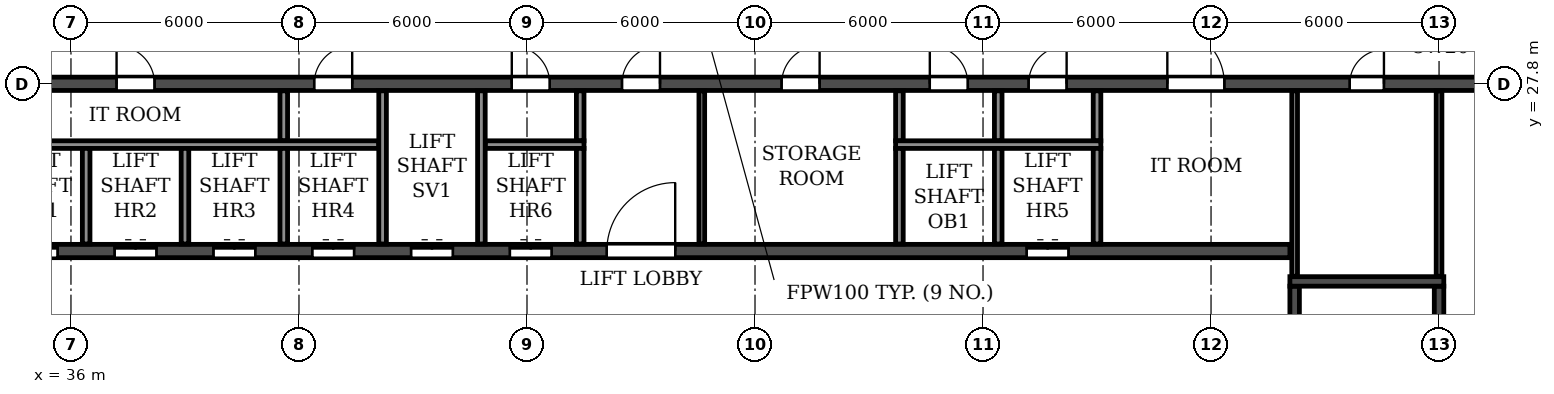
"""IFC4 building model, lengths in metres.
Left out: names, types, materials, properties, quantities, classifications, styles, units other than length and angle.
Written with IfcOpenShell. Run it as: python <this file> out.ifc"""

import sys

from ifc_helpers import new_model, si_unit, direction, frame, frame_2d, origin, place, context, subcontext, project, spatial, rectangle, extrude, element, fill, save


model = new_model("IFC4")
c1 = context("Model", 3, precision=1e-05, world=origin(), true_north=direction((0.0, 1.0)))
c2 = subcontext(c1, "Body", "Model", "MODEL_VIEW")
j1 = project(units=[si_unit("LENGTHUNIT", "METRE"), si_unit("PLANEANGLEUNIT", "RADIAN")], contexts=[c1])
p1 = place(None, origin())
s1 = spatial("IfcSite", under=j1, at=p1, CompositionType="ELEMENT")
p2 = place(p1, origin())
s2 = spatial("IfcBuilding", under=s1, at=p2, CompositionType="ELEMENT")
p3 = place(p2, frame((0.0, 0.0, 257.7)))
s3 = spatial("IfcBuildingStorey", under=s2, at=p3, CompositionType="ELEMENT", Elevation=257.7)
p4 = place(p3, frame((18.2, 27.8, 0.0), z_axis=(0.0, 0.0, 1.0), x_axis=(1.0, 0.0, 0.0)))
e1 = element("IfcWall", 1, at=p4, inside=s3, PredefinedType="SOLIDWALL", context=c2, shape_type="SweptSolid", body=[
    extrude(rectangle(XDim=65.6, YDim=0.35, at=frame_2d((32.8, 0.0))), origin(), (0.0, 0.0, 1.0), 3.0),
])
p5 = place(p4, frame((0.7, 0.0, 0.0)))
e2 = element("IfcOpeningElement", 2, at=p5, cuts=e1, PredefinedType="OPENING", context=c2, shape_type="SweptSolid", body=[
    extrude(rectangle(XDim=1.0, YDim=2.1, at=frame_2d((0.5, 1.05))), frame((0.0, 0.185, 0.0), z_axis=(0.0, -1.0, 0.0), x_axis=(1.0, 0.0, 0.0)), (0.0, 0.0, 1.0), 0.37),
])
p6 = place(p4, frame((4.05, 0.0, 0.0)))
e3 = element("IfcOpeningElement", 3, at=p6, cuts=e1, PredefinedType="OPENING", context=c2, shape_type="SweptSolid", body=[
    extrude(rectangle(XDim=0.9, YDim=2.1, at=frame_2d((0.45, 1.05))), frame((0.0, 0.185, 0.0), z_axis=(0.0, -1.0, 0.0), x_axis=(1.0, 0.0, 0.0)), (0.0, 0.0, 1.0), 0.37),
])
p7 = place(p4, frame((13.25, 0.0, 0.0)))
e4 = element("IfcOpeningElement", 4, at=p7, cuts=e1, PredefinedType="OPENING", context=c2, shape_type="SweptSolid", body=[
    extrude(rectangle(XDim=0.9, YDim=2.1, at=frame_2d((0.45, 1.05))), frame((0.0, 0.185, 0.0), z_axis=(0.0, -1.0, 0.0), x_axis=(1.0, 0.0, 0.0)), (0.0, 0.0, 1.0), 0.37),
])
p8 = place(p4, frame((19.0, 0.0, 0.0)))
e5 = element("IfcOpeningElement", 5, at=p8, cuts=e1, PredefinedType="OPENING", context=c2, shape_type="SweptSolid", body=[
    extrude(rectangle(XDim=1.0, YDim=2.1, at=frame_2d((0.5, 1.05))), frame((0.0, 0.185, 0.0), z_axis=(0.0, -1.0, 0.0), x_axis=(1.0, 0.0, 0.0)), (0.0, 0.0, 1.0), 0.37),
])
p9 = place(p4, frame((24.2, 0.0, 0.0)))
e6 = element("IfcOpeningElement", 6, at=p9, cuts=e1, PredefinedType="OPENING", context=c2, shape_type="SweptSolid", body=[
    extrude(rectangle(XDim=1.0, YDim=2.1, at=frame_2d((0.5, 1.05))), frame((0.0, 0.185, 0.0), z_axis=(0.0, -1.0, 0.0), x_axis=(1.0, 0.0, 0.0)), (0.0, 0.0, 1.0), 0.37),
])
p10 = place(p4, frame((29.4, 0.0, 0.0)))
e7 = element("IfcOpeningElement", 7, at=p10, cuts=e1, PredefinedType="OPENING", context=c2, shape_type="SweptSolid", body=[
    extrude(rectangle(XDim=1.0, YDim=2.1, at=frame_2d((0.5, 1.05))), frame((0.0, 0.185, 0.0), z_axis=(0.0, -1.0, 0.0), x_axis=(1.0, 0.0, 0.0)), (0.0, 0.0, 1.0), 0.37),
])
p11 = place(p4, frame((32.3, 0.0, 0.0)))
e8 = element("IfcOpeningElement", 8, at=p11, cuts=e1, PredefinedType="OPENING", context=c2, shape_type="SweptSolid", body=[
    extrude(rectangle(XDim=1.0, YDim=2.1, at=frame_2d((0.5, 1.05))), frame((0.0, 0.185, 0.0), z_axis=(0.0, -1.0, 0.0), x_axis=(1.0, 0.0, 0.0)), (0.0, 0.0, 1.0), 0.37),
])
p12 = place(p4, frame((36.5, 0.0, 0.0)))
e9 = element("IfcOpeningElement", 9, at=p12, cuts=e1, PredefinedType="OPENING", context=c2, shape_type="SweptSolid", body=[
    extrude(rectangle(XDim=1.0, YDim=2.1, at=frame_2d((0.5, 1.05))), frame((0.0, 0.185, 0.0), z_axis=(0.0, -1.0, 0.0), x_axis=(1.0, 0.0, 0.0)), (0.0, 0.0, 1.0), 0.37),
])
p13 = place(p4, frame((40.4, 0.0, 0.0)))
e10 = element("IfcOpeningElement", 10, at=p13, cuts=e1, PredefinedType="OPENING", context=c2, shape_type="SweptSolid", body=[
    extrude(rectangle(XDim=1.0, YDim=2.1, at=frame_2d((0.5, 1.05))), frame((0.0, 0.185, 0.0), z_axis=(0.0, -1.0, 0.0), x_axis=(1.0, 0.0, 0.0)), (0.0, 0.0, 1.0), 0.37),
])
p14 = place(p4, frame((43.0, 0.0, 0.0)))
e11 = element("IfcOpeningElement", 11, at=p14, cuts=e1, PredefinedType="OPENING", context=c2, shape_type="SweptSolid", body=[
    extrude(rectangle(XDim=1.0, YDim=2.1, at=frame_2d((0.5, 1.05))), frame((0.0, 0.185, 0.0), z_axis=(0.0, -1.0, 0.0), x_axis=(1.0, 0.0, 0.0)), (0.0, 0.0, 1.0), 0.37),
])
p15 = place(p4, frame((46.65, 0.0, 0.0)))
e12 = element("IfcOpeningElement", 12, at=p15, cuts=e1, PredefinedType="OPENING", context=c2, shape_type="SweptSolid", body=[
    extrude(rectangle(XDim=1.5, YDim=2.1, at=frame_2d((0.75, 1.05))), frame((0.0, 0.185, 0.0), z_axis=(0.0, -1.0, 0.0), x_axis=(1.0, 0.0, 0.0)), (0.0, 0.0, 1.0), 0.37),
])
p16 = place(p4, frame((51.45, 0.0, 0.0)))
e13 = element("IfcOpeningElement", 13, at=p16, cuts=e1, PredefinedType="OPENING", context=c2, shape_type="SweptSolid", body=[
    extrude(rectangle(XDim=0.9, YDim=2.1, at=frame_2d((0.45, 1.05))), frame((0.0, 0.185, 0.0), z_axis=(0.0, -1.0, 0.0), x_axis=(1.0, 0.0, 0.0)), (0.0, 0.0, 1.0), 0.37),
])
p17 = place(p4, frame((60.65, 0.0, 0.0)))
e14 = element("IfcOpeningElement", 14, at=p17, cuts=e1, PredefinedType="OPENING", context=c2, shape_type="SweptSolid", body=[
    extrude(rectangle(XDim=0.9, YDim=2.1, at=frame_2d((0.45, 1.05))), frame((0.0, 0.185, 0.0), z_axis=(0.0, -1.0, 0.0), x_axis=(1.0, 0.0, 0.0)), (0.0, 0.0, 1.0), 0.37),
])
p18 = place(p4, frame((63.9, 0.0, 0.0)))
e15 = element("IfcOpeningElement", 15, at=p18, cuts=e1, PredefinedType="OPENING", context=c2, shape_type="SweptSolid", body=[
    extrude(rectangle(XDim=1.0, YDim=2.1, at=frame_2d((0.5, 1.05))), frame((0.0, 0.185, 0.0), z_axis=(0.0, -1.0, 0.0), x_axis=(1.0, 0.0, 0.0)), (0.0, 0.0, 1.0), 0.37),
])
p19 = place(p3, frame((33.925, 23.4, 0.0), z_axis=(0.0, 0.0, 1.0), x_axis=(1.0, 0.0, 0.0)))
e16 = element("IfcWall", 16, at=p19, inside=s3, PredefinedType="SOLIDWALL", context=c2, shape_type="SweptSolid", body=[
    extrude(rectangle(XDim=34.15, YDim=0.35, at=frame_2d((17.075, 0.0))), origin(), (0.0, 0.0, 1.0), 3.0),
])
p20 = place(p19, frame((16.175, 0.0, 0.0)))
e17 = element("IfcOpeningElement", 17, at=p20, cuts=e16, PredefinedType="OPENING", context=c2, shape_type="SweptSolid", body=[
    extrude(rectangle(XDim=1.8, YDim=2.1, at=frame_2d((0.9, 1.05))), frame((0.0, 0.185, 0.0), z_axis=(0.0, -1.0, 0.0), x_axis=(1.0, 0.0, 0.0)), (0.0, 0.0, 1.0), 0.37),
])
p21 = place(p19, frame((0.625, 0.0, 0.0)))
e18 = element("IfcOpeningElement", 18, at=p21, cuts=e16, PredefinedType="OPENING", context=c2, shape_type="SweptSolid", body=[
    extrude(rectangle(XDim=1.1, YDim=2.1, at=frame_2d((0.55, 1.05))), frame((0.0, 0.185, 0.0), z_axis=(0.0, -1.0, 0.0), x_axis=(1.0, 0.0, 0.0)), (0.0, 0.0, 1.0), 0.37),
])
p22 = place(p19, frame((3.225, 0.0, 0.0)))
e19 = element("IfcOpeningElement", 19, at=p22, cuts=e16, PredefinedType="OPENING", context=c2, shape_type="SweptSolid", body=[
    extrude(rectangle(XDim=1.1, YDim=2.1, at=frame_2d((0.55, 1.05))), frame((0.0, 0.185, 0.0), z_axis=(0.0, -1.0, 0.0), x_axis=(1.0, 0.0, 0.0)), (0.0, 0.0, 1.0), 0.37),
])
p23 = place(p19, frame((5.825, 0.0, 0.0)))
e20 = element("IfcOpeningElement", 20, at=p23, cuts=e16, PredefinedType="OPENING", context=c2, shape_type="SweptSolid", body=[
    extrude(rectangle(XDim=1.1, YDim=2.1, at=frame_2d((0.55, 1.05))), frame((0.0, 0.185, 0.0), z_axis=(0.0, -1.0, 0.0), x_axis=(1.0, 0.0, 0.0)), (0.0, 0.0, 1.0), 0.37),
])
p24 = place(p19, frame((8.425, 0.0, 0.0)))
e21 = element("IfcOpeningElement", 21, at=p24, cuts=e16, PredefinedType="OPENING", context=c2, shape_type="SweptSolid", body=[
    extrude(rectangle(XDim=1.1, YDim=2.1, at=frame_2d((0.55, 1.05))), frame((0.0, 0.185, 0.0), z_axis=(0.0, -1.0, 0.0), x_axis=(1.0, 0.0, 0.0)), (0.0, 0.0, 1.0), 0.37),
])
p25 = place(p19, frame((11.025, 0.0, 0.0)))
e22 = element("IfcOpeningElement", 22, at=p25, cuts=e16, PredefinedType="OPENING", context=c2, shape_type="SweptSolid", body=[
    extrude(rectangle(XDim=1.1, YDim=2.1, at=frame_2d((0.55, 1.05))), frame((0.0, 0.185, 0.0), z_axis=(0.0, -1.0, 0.0), x_axis=(1.0, 0.0, 0.0)), (0.0, 0.0, 1.0), 0.37),
])
p26 = place(p19, frame((13.625, 0.0, 0.0)))
e23 = element("IfcOpeningElement", 23, at=p26, cuts=e16, PredefinedType="OPENING", context=c2, shape_type="SweptSolid", body=[
    extrude(rectangle(XDim=1.1, YDim=2.1, at=frame_2d((0.55, 1.05))), frame((0.0, 0.185, 0.0), z_axis=(0.0, -1.0, 0.0), x_axis=(1.0, 0.0, 0.0)), (0.0, 0.0, 1.0), 0.37),
])
p27 = place(p19, frame((27.225, 0.0, 0.0)))
e24 = element("IfcOpeningElement", 24, at=p27, cuts=e16, PredefinedType="OPENING", context=c2, shape_type="SweptSolid", body=[
    extrude(rectangle(XDim=1.1, YDim=2.1, at=frame_2d((0.55, 1.05))), frame((0.0, 0.185, 0.0), z_axis=(0.0, -1.0, 0.0), x_axis=(1.0, 0.0, 0.0)), (0.0, 0.0, 1.0), 0.37),
])
p28 = place(p3, frame((68.2, 14.775, 0.0), z_axis=(0.0, 0.0, 1.0), x_axis=(0.0, 1.0, 0.0)))
e25 = element("IfcWall", 25, at=p28, inside=s3, PredefinedType="SOLIDWALL", context=c2, shape_type="SweptSolid", body=[
    extrude(rectangle(XDim=7.7, YDim=0.25, at=frame_2d((3.85, 0.0))), origin(), (0.0, 0.0, 1.0), 3.0),
])
p29 = place(p28, frame((0.525, 0.0, 0.0)))
e26 = element("IfcOpeningElement", 26, at=p29, cuts=e25, PredefinedType="OPENING", context=c2, shape_type="SweptSolid", body=[
    extrude(rectangle(XDim=1.0, YDim=2.1, at=frame_2d((0.5, 1.05))), frame((0.0, 0.135, 0.0), z_axis=(0.0, -1.0, 0.0), x_axis=(1.0, 0.0, 0.0)), (0.0, 0.0, 1.0), 0.27),
])
p30 = place(p3, frame((72.0, 14.775, 0.0), z_axis=(0.0, 0.0, 1.0), x_axis=(0.0, 1.0, 0.0)))
e27 = element("IfcWall", 27, at=p30, inside=s3, PredefinedType="SOLIDWALL", context=c2, shape_type="SweptSolid", body=[
    extrude(rectangle(XDim=7.7, YDim=0.25, at=frame_2d((3.85, 0.0))), origin(), (0.0, 0.0, 1.0), 3.0),
])
p31 = place(p3, frame((68.075, 22.6, 0.0), z_axis=(0.0, 0.0, 1.0), x_axis=(1.0, 0.0, 0.0)))
e28 = element("IfcWall", 28, at=p31, inside=s3, PredefinedType="SOLIDWALL", context=c2, shape_type="SweptSolid", body=[
    extrude(rectangle(XDim=4.05, YDim=0.25, at=frame_2d((2.025, 0.0))), origin(), (0.0, 0.0, 1.0), 3.0),
])
p32 = place(p3, frame((52.6, 23.585, 0.0), z_axis=(0.0, 0.0, 1.0), x_axis=(0.0, 1.0, 0.0)))
e29 = element("IfcWall", 29, at=p32, inside=s3, PredefinedType="PARTITIONING", context=c2, shape_type="SweptSolid", body=[
    extrude(rectangle(XDim=4.03, YDim=0.15, at=frame_2d((2.015, 0.0))), origin(), (0.0, 0.0, 1.0), 3.0),
])
for number, where, z_axis, x_axis in (
    (30, (41.6, 26.3, 0.0), (0.0, 0.0, 1.0), (0.0, 1.0, 0.0)),
    (31, (49.4, 26.3, 0.0), (0.0, 0.0, 1.0), (0.0, 1.0, 0.0)),
    (32, (57.8, 26.3, 0.0), (0.0, 0.0, 1.0), (0.0, 1.0, 0.0)),
    (33, (60.4, 26.3, 0.0), (0.0, 0.0, 1.0), (0.0, 1.0, 0.0)),
    (34, (63.0, 26.3, 0.0), (0.0, 0.0, 1.0), (0.0, 1.0, 0.0)),
):
    element("IfcWall", number, at=place(p3, frame(where, z_axis=z_axis, x_axis=x_axis)), inside=s3, PredefinedType="PARTITIONING", context=c2, shape_type="SweptSolid", body=[
        extrude(rectangle(XDim=1.315, YDim=0.2, at=frame_2d((0.657, 0.0))), origin(), (0.0, 0.0, 1.0), 3.0),
    ])
for number, where, z_axis, x_axis in (
    (35, (68.2, 22.735, 0.0), (0.0, 0.0, 1.0), (0.0, 1.0, 0.0)),
    (36, (72.0, 22.735, 0.0), (0.0, 0.0, 1.0), (0.0, 1.0, 0.0)),
):
    element("IfcWall", number, at=place(p3, frame(where, z_axis=z_axis, x_axis=x_axis)), inside=s3, PredefinedType="PARTITIONING", context=c2, shape_type="SweptSolid", body=[
        extrude(rectangle(XDim=4.88, YDim=0.15, at=frame_2d((2.44, 0.0))), origin(), (0.0, 0.0, 1.0), 3.0),
    ])
p33 = place(p3, frame((33.7, 26.2, 0.0), z_axis=(0.0, 0.0, 1.0), x_axis=(1.0, 0.0, 0.0)))
e37 = element("IfcWall", 37, at=p33, inside=s3, PredefinedType="PARTITIONING", context=c2, shape_type="SweptSolid", body=[
    extrude(rectangle(XDim=10.4, YDim=0.2, at=frame_2d((5.2, 0.0))), origin(), (0.0, 0.0, 1.0), 3.0),
])
p34 = place(p3, frame((46.9, 26.2, 0.0), z_axis=(0.0, 0.0, 1.0), x_axis=(1.0, 0.0, 0.0)))
e38 = element("IfcWall", 38, at=p34, inside=s3, PredefinedType="PARTITIONING", context=c2, shape_type="SweptSolid", body=[
    extrude(rectangle(XDim=2.6, YDim=0.2, at=frame_2d((1.3, 0.0))), origin(), (0.0, 0.0, 1.0), 3.0),
])
p35 = place(p3, frame((57.7, 26.2, 0.0), z_axis=(0.0, 0.0, 1.0), x_axis=(1.0, 0.0, 0.0)))
e39 = element("IfcWall", 39, at=p35, inside=s3, PredefinedType="PARTITIONING", context=c2, shape_type="SweptSolid", body=[
    extrude(rectangle(XDim=5.4, YDim=0.2, at=frame_2d((2.7, 0.0))), origin(), (0.0, 0.0, 1.0), 3.0),
])
for number, where, z_axis, x_axis in (
    (40, (36.4, 23.585, 0.0), (0.0, 0.0, 1.0), (0.0, 1.0, 0.0)),
    (41, (39.0, 23.585, 0.0), (0.0, 0.0, 1.0), (0.0, 1.0, 0.0)),
    (42, (41.6, 23.585, 0.0), (0.0, 0.0, 1.0), (0.0, 1.0, 0.0)),
):
    element("IfcWall", number, at=place(p3, frame(where, z_axis=z_axis, x_axis=x_axis)), inside=s3, PredefinedType="PARTITIONING", context=c2, shape_type="SweptSolid", body=[
        extrude(rectangle(XDim=2.515, YDim=0.2, at=frame_2d((1.258, 0.0))), origin(), (0.0, 0.0, 1.0), 3.0),
    ])
for number, where, z_axis, x_axis in (
    (43, (44.2, 23.585, 0.0), (0.0, 0.0, 1.0), (0.0, 1.0, 0.0)),
    (44, (46.8, 23.585, 0.0), (0.0, 0.0, 1.0), (0.0, 1.0, 0.0)),
):
    element("IfcWall", number, at=place(p3, frame(where, z_axis=z_axis, x_axis=x_axis)), inside=s3, PredefinedType="PARTITIONING", context=c2, shape_type="SweptSolid", body=[
        extrude(rectangle(XDim=4.03, YDim=0.2, at=frame_2d((2.015, 0.0))), origin(), (0.0, 0.0, 1.0), 3.0),
    ])
for number, where, z_axis, x_axis in (
    (45, (49.4, 23.585, 0.0), (0.0, 0.0, 1.0), (0.0, 1.0, 0.0)),
    (46, (57.8, 23.585, 0.0), (0.0, 0.0, 1.0), (0.0, 1.0, 0.0)),
    (47, (60.4, 23.585, 0.0), (0.0, 0.0, 1.0), (0.0, 1.0, 0.0)),
    (48, (63.0, 23.585, 0.0), (0.0, 0.0, 1.0), (0.0, 1.0, 0.0)),
):
    element("IfcWall", number, at=place(p3, frame(where, z_axis=z_axis, x_axis=x_axis)), inside=s3, PredefinedType="PARTITIONING", context=c2, shape_type="SweptSolid", body=[
        extrude(rectangle(XDim=2.515, YDim=0.2, at=frame_2d((1.258, 0.0))), origin(), (0.0, 0.0, 1.0), 3.0),
    ])
p36 = place(p8, origin())
e49 = element("IfcDoor", 49, at=p36, inside=s3, OperationType="SINGLE_SWING_LEFT", PredefinedType="DOOR", context=c2, shape_type="SweptSolid", body=[
    extrude(rectangle(XDim=1.0, YDim=2.1, at=frame_2d((0.5, 1.05))), frame((0.0, 0.025, 0.0), z_axis=(0.0, -1.0, 0.0), x_axis=(1.0, 0.0, 0.0)), (0.0, 0.0, 1.0), 0.05),
])
fill(e5, e49)
p37 = place(p9, origin())
e50 = element("IfcDoor", 50, at=p37, inside=s3, OperationType="SINGLE_SWING_RIGHT", PredefinedType="DOOR", context=c2, shape_type="SweptSolid", body=[
    extrude(rectangle(XDim=1.0, YDim=2.1, at=frame_2d((0.5, 1.05))), frame((0.0, 0.025, 0.0), z_axis=(0.0, -1.0, 0.0), x_axis=(1.0, 0.0, 0.0)), (0.0, 0.0, 1.0), 0.05),
])
fill(e6, e50)
p38 = place(p10, origin())
e51 = element("IfcDoor", 51, at=p38, inside=s3, OperationType="SINGLE_SWING_LEFT", PredefinedType="DOOR", context=c2, shape_type="SweptSolid", body=[
    extrude(rectangle(XDim=1.0, YDim=2.1, at=frame_2d((0.5, 1.05))), frame((0.0, 0.025, 0.0), z_axis=(0.0, -1.0, 0.0), x_axis=(1.0, 0.0, 0.0)), (0.0, 0.0, 1.0), 0.05),
])
fill(e7, e51)
p39 = place(p11, origin())
e52 = element("IfcDoor", 52, at=p39, inside=s3, OperationType="SINGLE_SWING_RIGHT", PredefinedType="DOOR", context=c2, shape_type="SweptSolid", body=[
    extrude(rectangle(XDim=1.0, YDim=2.1, at=frame_2d((0.5, 1.05))), frame((0.0, 0.025, 0.0), z_axis=(0.0, -1.0, 0.0), x_axis=(1.0, 0.0, 0.0)), (0.0, 0.0, 1.0), 0.05),
])
fill(e8, e52)
p40 = place(p12, origin())
e53 = element("IfcDoor", 53, at=p40, inside=s3, OperationType="SINGLE_SWING_RIGHT", PredefinedType="DOOR", context=c2, shape_type="SweptSolid", body=[
    extrude(rectangle(XDim=1.0, YDim=2.1, at=frame_2d((0.5, 1.05))), frame((0.0, 0.025, 0.0), z_axis=(0.0, -1.0, 0.0), x_axis=(1.0, 0.0, 0.0)), (0.0, 0.0, 1.0), 0.05),
])
fill(e9, e53)
p41 = place(p13, origin())
e54 = element("IfcDoor", 54, at=p41, inside=s3, OperationType="SINGLE_SWING_LEFT", PredefinedType="DOOR", context=c2, shape_type="SweptSolid", body=[
    extrude(rectangle(XDim=1.0, YDim=2.1, at=frame_2d((0.5, 1.05))), frame((0.0, 0.025, 0.0), z_axis=(0.0, -1.0, 0.0), x_axis=(1.0, 0.0, 0.0)), (0.0, 0.0, 1.0), 0.05),
])
fill(e10, e54)
p42 = place(p14, origin())
e55 = element("IfcDoor", 55, at=p42, inside=s3, OperationType="SINGLE_SWING_RIGHT", PredefinedType="DOOR", context=c2, shape_type="SweptSolid", body=[
    extrude(rectangle(XDim=1.0, YDim=2.1, at=frame_2d((0.5, 1.05))), frame((0.0, 0.025, 0.0), z_axis=(0.0, -1.0, 0.0), x_axis=(1.0, 0.0, 0.0)), (0.0, 0.0, 1.0), 0.05),
])
fill(e11, e55)
p43 = place(p15, origin())
e56 = element("IfcDoor", 56, at=p43, inside=s3, OperationType="DOUBLE_DOOR_SINGLE_SWING", PredefinedType="DOOR", context=c2, shape_type="SweptSolid", body=[
    extrude(rectangle(XDim=1.5, YDim=2.1, at=frame_2d((0.75, 1.05))), frame((0.0, 0.025, 0.0), z_axis=(0.0, -1.0, 0.0), x_axis=(1.0, 0.0, 0.0)), (0.0, 0.0, 1.0), 0.05),
])
fill(e12, e56)
p44 = place(p16, origin())
e57 = element("IfcDoor", 57, at=p44, inside=s3, OperationType="SINGLE_SWING_RIGHT", PredefinedType="DOOR", context=c2, shape_type="SweptSolid", body=[
    extrude(rectangle(XDim=0.9, YDim=2.1, at=frame_2d((0.45, 1.05))), frame((0.0, 0.025, 0.0), z_axis=(0.0, -1.0, 0.0), x_axis=(1.0, 0.0, 0.0)), (0.0, 0.0, 1.0), 0.05),
])
fill(e13, e57)
p45 = place(p20, origin())
e58 = element("IfcDoor", 58, at=p45, inside=s3, OperationType="DOUBLE_DOOR_SINGLE_SWING", PredefinedType="DOOR", context=c2, shape_type="SweptSolid", body=[
    extrude(rectangle(XDim=1.8, YDim=2.1, at=frame_2d((0.9, 1.05))), frame((0.0, 0.025, 0.0), z_axis=(0.0, -1.0, 0.0), x_axis=(1.0, 0.0, 0.0)), (0.0, 0.0, 1.0), 0.05),
])
fill(e17, e58)
p46 = place(p21, origin())
e59 = element("IfcDoor", 59, at=p46, inside=s3, OperationType="DOUBLE_DOOR_SLIDING", PredefinedType="DOOR", context=c2, shape_type="SweptSolid", body=[
    extrude(rectangle(XDim=1.1, YDim=2.1, at=frame_2d((0.55, 1.05))), frame((0.0, 0.025, 0.0), z_axis=(0.0, -1.0, 0.0), x_axis=(1.0, 0.0, 0.0)), (0.0, 0.0, 1.0), 0.05),
])
fill(e18, e59)
p47 = place(p22, origin())
e60 = element("IfcDoor", 60, at=p47, inside=s3, OperationType="DOUBLE_DOOR_SLIDING", PredefinedType="DOOR", context=c2, shape_type="SweptSolid", body=[
    extrude(rectangle(XDim=1.1, YDim=2.1, at=frame_2d((0.55, 1.05))), frame((0.0, 0.025, 0.0), z_axis=(0.0, -1.0, 0.0), x_axis=(1.0, 0.0, 0.0)), (0.0, 0.0, 1.0), 0.05),
])
fill(e19, e60)
p48 = place(p23, origin())
e61 = element("IfcDoor", 61, at=p48, inside=s3, OperationType="DOUBLE_DOOR_SLIDING", PredefinedType="DOOR", context=c2, shape_type="SweptSolid", body=[
    extrude(rectangle(XDim=1.1, YDim=2.1, at=frame_2d((0.55, 1.05))), frame((0.0, 0.025, 0.0), z_axis=(0.0, -1.0, 0.0), x_axis=(1.0, 0.0, 0.0)), (0.0, 0.0, 1.0), 0.05),
])
fill(e20, e61)
p49 = place(p24, origin())
e62 = element("IfcDoor", 62, at=p49, inside=s3, OperationType="DOUBLE_DOOR_SLIDING", PredefinedType="DOOR", context=c2, shape_type="SweptSolid", body=[
    extrude(rectangle(XDim=1.1, YDim=2.1, at=frame_2d((0.55, 1.05))), frame((0.0, 0.025, 0.0), z_axis=(0.0, -1.0, 0.0), x_axis=(1.0, 0.0, 0.0)), (0.0, 0.0, 1.0), 0.05),
])
fill(e21, e62)
p50 = place(p25, origin())
e63 = element("IfcDoor", 63, at=p50, inside=s3, OperationType="DOUBLE_DOOR_SLIDING", PredefinedType="DOOR", context=c2, shape_type="SweptSolid", body=[
    extrude(rectangle(XDim=1.1, YDim=2.1, at=frame_2d((0.55, 1.05))), frame((0.0, 0.025, 0.0), z_axis=(0.0, -1.0, 0.0), x_axis=(1.0, 0.0, 0.0)), (0.0, 0.0, 1.0), 0.05),
])
fill(e22, e63)
p51 = place(p26, origin())
e64 = element("IfcDoor", 64, at=p51, inside=s3, OperationType="DOUBLE_DOOR_SLIDING", PredefinedType="DOOR", context=c2, shape_type="SweptSolid", body=[
    extrude(rectangle(XDim=1.1, YDim=2.1, at=frame_2d((0.55, 1.05))), frame((0.0, 0.025, 0.0), z_axis=(0.0, -1.0, 0.0), x_axis=(1.0, 0.0, 0.0)), (0.0, 0.0, 1.0), 0.05),
])
fill(e23, e64)
p52 = place(p27, origin())
e65 = element("IfcDoor", 65, at=p52, inside=s3, OperationType="DOUBLE_DOOR_SLIDING", PredefinedType="DOOR", context=c2, shape_type="SweptSolid", body=[
    extrude(rectangle(XDim=1.1, YDim=2.1, at=frame_2d((0.55, 1.05))), frame((0.0, 0.025, 0.0), z_axis=(0.0, -1.0, 0.0), x_axis=(1.0, 0.0, 0.0)), (0.0, 0.0, 1.0), 0.05),
])
fill(e24, e65)
save(model, sys.argv[1])
